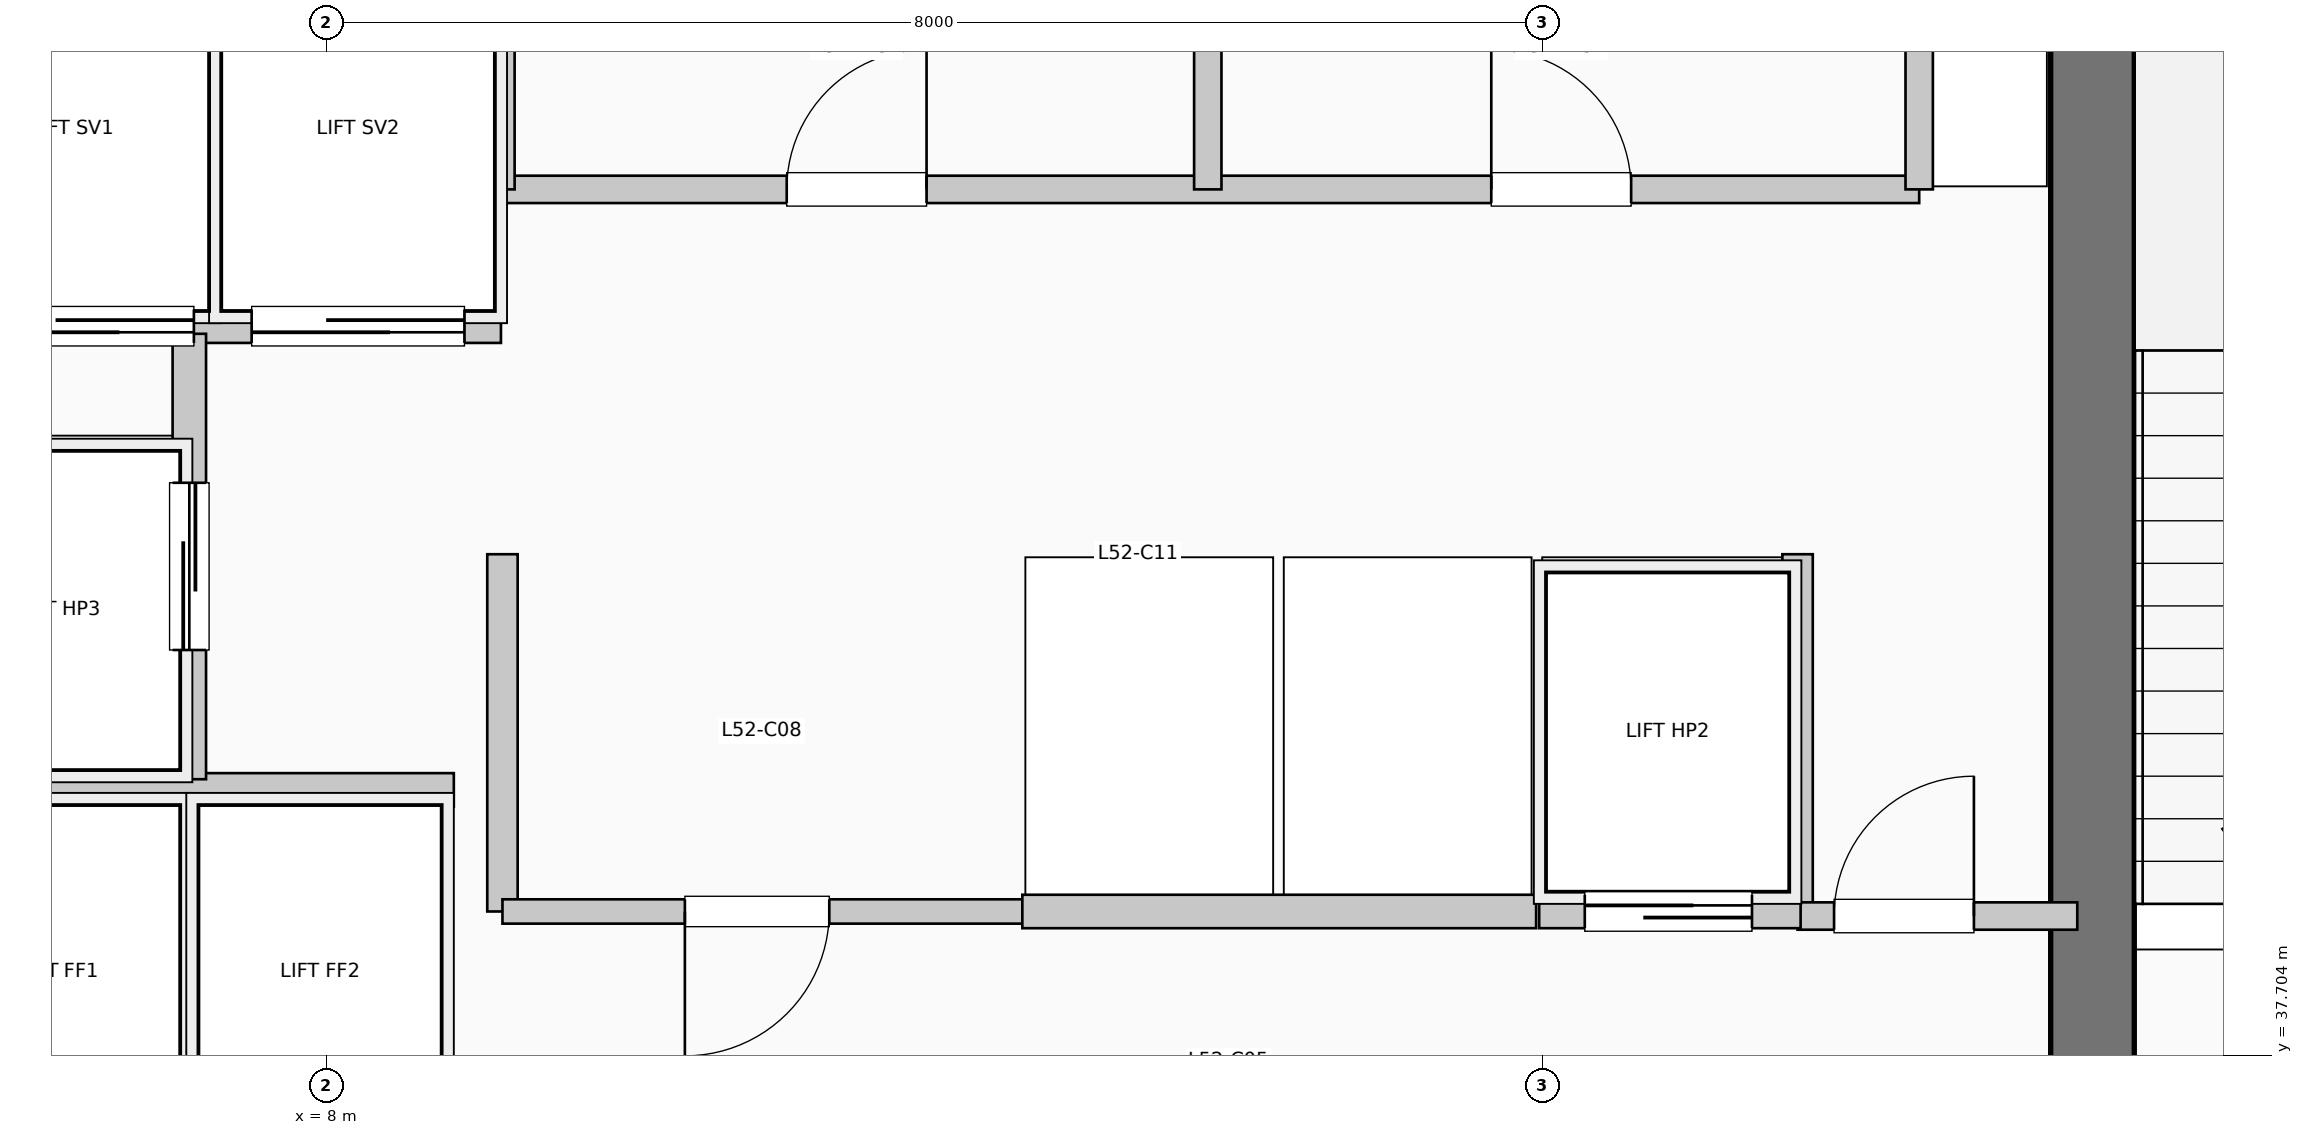
"""IFC4 building model, lengths in metres.
Left out: names, types, materials, properties, quantities, classifications, styles, units other than length and angle.
Written with IfcOpenShell. Run it as: python <this file> out.ifc"""

import sys

from ifc_helpers import new_model, si_unit, direction, frame, frame_2d, origin, place, context, subcontext, project, spatial, rectangle, extrude, element, fill, save


model = new_model("IFC4")
c1 = context("Model", 3, precision=1e-05, world=origin(), true_north=direction((0.0, 1.0)))
c2 = subcontext(c1, "Body", "Model", "MODEL_VIEW")
j1 = project(units=[si_unit("LENGTHUNIT", "METRE"), si_unit("PLANEANGLEUNIT", "RADIAN")], contexts=[c1])
p1 = place(None, origin())
s1 = spatial("IfcSite", under=j1, at=p1, CompositionType="ELEMENT")
p2 = place(p1, origin())
s2 = spatial("IfcBuilding", under=s1, at=p2, CompositionType="ELEMENT")
p3 = place(p2, frame((0.0, 0.0, 215.16)))
s3 = spatial("IfcBuildingStorey", under=s2, at=p3, CompositionType="ELEMENT", Elevation=215.16)
p4 = place(p3, frame((19.62, 37.15, 0.0), z_axis=(0.0, 0.0, 1.0), x_axis=(0.0, 1.0, 0.0)))
e1 = element("IfcWall", 1, at=p4, inside=s3, PredefinedType="SHEAR", context=c2, shape_type="SweptSolid", body=[
    extrude(rectangle(XDim=7.89, YDim=0.55, at=frame_2d((3.945, 0.0))), origin(), (0.0, 0.0, 1.0), 4.62),
])
p5 = place(p3, frame((5.38, 39.45, 0.0), z_axis=(0.0, 0.0, 1.0), x_axis=(1.0, 0.0, 0.0)))
e2 = element("IfcWall", 2, at=p5, inside=s3, PredefinedType="PARTITIONING", context=c2, shape_type="SweptSolid", body=[
    extrude(rectangle(XDim=3.46, YDim=0.22, at=frame_2d((1.73, 0.0))), origin(), (0.0, 0.0, 1.0), 4.37),
])
p6 = place(p3, frame((5.38, 42.5, 0.0), z_axis=(0.0, 0.0, 1.0), x_axis=(1.0, 0.0, 0.0)))
e3 = element("IfcWall", 3, at=p6, inside=s3, PredefinedType="PARTITIONING", context=c2, shape_type="SweptSolid", body=[
    extrude(rectangle(XDim=3.77, YDim=0.22, at=frame_2d((1.885, 0.0))), origin(), (0.0, 0.0, 1.0), 4.37),
])
p7 = place(p6, frame((1.75, 0.0, 0.0), z_axis=(0.0, 0.0, 1.0), x_axis=(-1.0, 0.0, 0.0)))
e4 = element("IfcOpeningElement", 4, at=p7, cuts=e3, PredefinedType="OPENING", context=c2, shape_type="SweptSolid", body=[
    extrude(rectangle(XDim=1.4, YDim=2.2, at=frame_2d((0.7, 1.1))), frame((0.0, 0.12, 0.0), z_axis=(0.0, -1.0, 0.0), x_axis=(1.0, 0.0, 0.0)), (0.0, 0.0, 1.0), 0.24),
])
p8 = place(p6, frame((3.53, 0.0, 0.0), z_axis=(0.0, 0.0, 1.0), x_axis=(-1.0, 0.0, 0.0)))
e5 = element("IfcOpeningElement", 5, at=p8, cuts=e3, PredefinedType="OPENING", context=c2, shape_type="SweptSolid", body=[
    extrude(rectangle(XDim=1.4, YDim=2.2, at=frame_2d((0.7, 1.1))), frame((0.0, 0.12, 0.0), z_axis=(0.0, -1.0, 0.0), x_axis=(1.0, 0.0, 0.0)), (0.0, 0.0, 1.0), 0.24),
])
p9 = place(p3, frame((7.1, 39.52, 0.0), z_axis=(0.0, 0.0, 1.0), x_axis=(0.0, 1.0, 0.0)))
e6 = element("IfcWall", 6, at=p9, inside=s3, PredefinedType="PARTITIONING", context=c2, shape_type="SweptSolid", body=[
    extrude(rectangle(XDim=2.93, YDim=0.22, at=frame_2d((1.465, 0.0))), origin(), (0.0, 0.0, 1.0), 4.37),
])
p10 = place(p9, frame((0.85, 0.0, 0.0)))
e7 = element("IfcOpeningElement", 7, at=p10, cuts=e6, PredefinedType="OPENING", context=c2, shape_type="SweptSolid", body=[
    extrude(rectangle(XDim=1.1, YDim=2.2, at=frame_2d((0.55, 1.1))), frame((0.0, 0.12, 0.0), z_axis=(0.0, -1.0, 0.0), x_axis=(1.0, 0.0, 0.0)), (0.0, 0.0, 1.0), 0.24),
])
for number, where, z_axis, x_axis in (
    (8, (9.16, 38.65, 0.0), (0.0, 0.0, 1.0), (0.0, 1.0, 0.0)),
    (9, (17.68, 38.65, 0.0), (0.0, 0.0, 1.0), (0.0, 1.0, 0.0)),
):
    element("IfcWall", number, at=place(p3, frame(where, z_axis=z_axis, x_axis=x_axis)), inside=s3, PredefinedType="PARTITIONING", context=c2, shape_type="SweptSolid", body=[
        extrude(rectangle(XDim=2.35, YDim=0.2, at=frame_2d((1.175, 0.0))), origin(), (0.0, 0.0, 1.0), 4.37),
    ])
p11 = place(p3, frame((17.68, 38.62, 0.0), z_axis=(0.0, 0.0, 1.0), x_axis=(1.0, 0.0, 0.0)))
e10 = element("IfcWall", 10, at=p11, inside=s3, PredefinedType="PARTITIONING", context=c2, shape_type="SweptSolid", body=[
    extrude(rectangle(XDim=1.84, YDim=0.18, at=frame_2d((0.92, 0.0))), origin(), (0.0, 0.0, 1.0), 4.37),
])
p12 = place(p11, frame((0.24, 0.0, 0.0)))
e11 = element("IfcOpeningElement", 11, at=p12, cuts=e10, PredefinedType="OPENING", context=c2, shape_type="SweptSolid", body=[
    extrude(rectangle(XDim=0.92, YDim=2.1, at=frame_2d((0.46, 1.05))), frame((0.0, 0.1, 0.0), z_axis=(0.0, -1.0, 0.0), x_axis=(1.0, 0.0, 0.0)), (0.0, 0.0, 1.0), 0.2),
])
p13 = place(p3, frame((9.16, 38.65, 0.0), z_axis=(0.0, 0.0, 1.0), x_axis=(1.0, 0.0, 0.0)))
e12 = element("IfcWall", 12, at=p13, inside=s3, PredefinedType="PARTITIONING", context=c2, shape_type="SweptSolid", body=[
    extrude(rectangle(XDim=3.42, YDim=0.16, at=frame_2d((1.71, 0.0))), origin(), (0.0, 0.0, 1.0), 4.37),
])
p14 = place(p13, frame((2.15, 0.0, 0.0), z_axis=(0.0, 0.0, 1.0), x_axis=(-1.0, 0.0, 0.0)))
e13 = element("IfcOpeningElement", 13, at=p14, cuts=e12, PredefinedType="OPENING", context=c2, shape_type="SweptSolid", body=[
    extrude(rectangle(XDim=0.95, YDim=2.15, at=frame_2d((0.475, 1.075))), frame((0.0, 0.09, 0.0), z_axis=(0.0, -1.0, 0.0), x_axis=(1.0, 0.0, 0.0)), (0.0, 0.0, 1.0), 0.18),
])
p15 = place(p3, frame((12.58, 38.65, 0.0), z_axis=(0.0, 0.0, 1.0), x_axis=(1.0, 0.0, 0.0)))
e14 = element("IfcWall", 14, at=p15, inside=s3, PredefinedType="PARTITIONING", context=c2, shape_type="SweptSolid", body=[
    extrude(rectangle(XDim=3.38, YDim=0.22, at=frame_2d((1.69, 0.0))), origin(), (0.0, 0.0, 1.0), 4.37),
])
p16 = place(p3, frame((15.98, 38.65, 0.0), z_axis=(0.0, 0.0, 1.0), x_axis=(1.0, 0.0, 0.0)))
e15 = element("IfcWall", 15, at=p16, inside=s3, PredefinedType="PARTITIONING", context=c2, shape_type="SweptSolid", body=[
    extrude(rectangle(XDim=1.72, YDim=0.22, at=frame_2d((0.86, 0.0))), origin(), (0.0, 0.0, 1.0), 4.37),
])
p17 = place(p16, frame((0.3, 0.0, 0.0)))
e16 = element("IfcOpeningElement", 16, at=p17, cuts=e15, PredefinedType="OPENING", context=c2, shape_type="SweptSolid", body=[
    extrude(rectangle(XDim=1.1, YDim=2.2, at=frame_2d((0.55, 1.1))), frame((0.0, 0.12, 0.0), z_axis=(0.0, -1.0, 0.0), x_axis=(1.0, 0.0, 0.0)), (0.0, 0.0, 1.0), 0.24),
])
p18 = place(p3, frame((9.15, 43.4, 0.0), z_axis=(0.0, 0.0, 1.0), x_axis=(1.0, 0.0, 0.0)))
e17 = element("IfcWall", 17, at=p18, inside=s3, PredefinedType="PLUMBINGWALL", context=c2, shape_type="SweptSolid", body=[
    extrude(rectangle(XDim=9.33, YDim=0.18, at=frame_2d((4.665, 0.0))), origin(), (0.0, 0.0, 1.0), 4.37),
])
p19 = place(p18, frame((1.88, 0.0, 0.0)))
e18 = element("IfcOpeningElement", 18, at=p19, cuts=e17, PredefinedType="OPENING", context=c2, shape_type="SweptSolid", body=[
    extrude(rectangle(XDim=0.92, YDim=2.1, at=frame_2d((0.46, 1.05))), frame((0.0, 0.1, 0.0), z_axis=(0.0, -1.0, 0.0), x_axis=(1.0, 0.0, 0.0)), (0.0, 0.0, 1.0), 0.2),
])
p20 = place(p18, frame((6.515, 0.0, 0.0)))
e19 = element("IfcOpeningElement", 19, at=p20, cuts=e17, PredefinedType="OPENING", context=c2, shape_type="SweptSolid", body=[
    extrude(rectangle(XDim=0.92, YDim=2.1, at=frame_2d((0.46, 1.05))), frame((0.0, 0.1, 0.0), z_axis=(0.0, -1.0, 0.0), x_axis=(1.0, 0.0, 0.0)), (0.0, 0.0, 1.0), 0.2),
])
for number, where, z_axis, x_axis in (
    (20, (9.15, 43.4, 0.0), (0.0, 0.0, 1.0), (0.0, 1.0, 0.0)),
    (21, (18.48, 43.4, 0.0), (0.0, 0.0, 1.0), (0.0, 1.0, 0.0)),
    (22, (13.8, 43.4, 0.0), (0.0, 0.0, 1.0), (0.0, 1.0, 0.0)),
):
    element("IfcWall", number, at=place(p3, frame(where, z_axis=z_axis, x_axis=x_axis)), inside=s3, PredefinedType="PLUMBINGWALL", context=c2, shape_type="SweptSolid", body=[
        extrude(rectangle(XDim=1.88, YDim=0.18, at=frame_2d((0.94, 0.0))), origin(), (0.0, 0.0, 1.0), 4.37),
    ])
p21 = place(p7, origin())
e23 = element("IfcDoor", 23, at=p21, inside=s3, OperationType="SLIDING_TO_LEFT", PredefinedType="DOOR", context=c2, shape_type="SweptSolid", body=[
    extrude(rectangle(XDim=1.4, YDim=2.2, at=frame_2d((0.7, 1.1))), frame((0.0, 0.025, 0.0), z_axis=(0.0, -1.0, 0.0), x_axis=(1.0, 0.0, 0.0)), (0.0, 0.0, 1.0), 0.05),
])
fill(e4, e23)
p22 = place(p8, origin())
e24 = element("IfcDoor", 24, at=p22, inside=s3, OperationType="SLIDING_TO_LEFT", PredefinedType="DOOR", context=c2, shape_type="SweptSolid", body=[
    extrude(rectangle(XDim=1.4, YDim=2.2, at=frame_2d((0.7, 1.1))), frame((0.0, 0.025, 0.0), z_axis=(0.0, -1.0, 0.0), x_axis=(1.0, 0.0, 0.0)), (0.0, 0.0, 1.0), 0.05),
])
fill(e5, e24)
p23 = place(p10, origin())
e25 = element("IfcDoor", 25, at=p23, inside=s3, OperationType="SLIDING_TO_LEFT", PredefinedType="DOOR", context=c2, shape_type="SweptSolid", body=[
    extrude(rectangle(XDim=1.1, YDim=2.2, at=frame_2d((0.55, 1.1))), frame((0.0, 0.025, 0.0), z_axis=(0.0, -1.0, 0.0), x_axis=(1.0, 0.0, 0.0)), (0.0, 0.0, 1.0), 0.05),
])
fill(e7, e25)
p24 = place(p12, origin())
e26 = element("IfcDoor", 26, at=p24, inside=s3, OperationType="SINGLE_SWING_RIGHT", PredefinedType="DOOR", context=c2, shape_type="SweptSolid", body=[
    extrude(rectangle(XDim=0.92, YDim=2.1, at=frame_2d((0.46, 1.05))), frame((0.0, 0.025, 0.0), z_axis=(0.0, -1.0, 0.0), x_axis=(1.0, 0.0, 0.0)), (0.0, 0.0, 1.0), 0.05),
])
fill(e11, e26)
p25 = place(p14, origin())
e27 = element("IfcDoor", 27, at=p25, inside=s3, OperationType="SINGLE_SWING_LEFT", PredefinedType="DOOR", context=c2, shape_type="SweptSolid", body=[
    extrude(rectangle(XDim=0.95, YDim=2.15, at=frame_2d((0.475, 1.075))), frame((0.0, 0.025, 0.0), z_axis=(0.0, -1.0, 0.0), x_axis=(1.0, 0.0, 0.0)), (0.0, 0.0, 1.0), 0.05),
])
fill(e13, e27)
p26 = place(p17, origin())
e28 = element("IfcDoor", 28, at=p26, inside=s3, OperationType="SLIDING_TO_LEFT", PredefinedType="DOOR", context=c2, shape_type="SweptSolid", body=[
    extrude(rectangle(XDim=1.1, YDim=2.2, at=frame_2d((0.55, 1.1))), frame((0.0, 0.025, 0.0), z_axis=(0.0, -1.0, 0.0), x_axis=(1.0, 0.0, 0.0)), (0.0, 0.0, 1.0), 0.05),
])
fill(e16, e28)
p27 = place(p19, origin())
e29 = element("IfcDoor", 29, at=p27, inside=s3, OperationType="SINGLE_SWING_RIGHT", PredefinedType="DOOR", context=c2, shape_type="SweptSolid", body=[
    extrude(rectangle(XDim=0.92, YDim=2.1, at=frame_2d((0.46, 1.05))), frame((0.0, 0.025, 0.0), z_axis=(0.0, -1.0, 0.0), x_axis=(1.0, 0.0, 0.0)), (0.0, 0.0, 1.0), 0.05),
])
fill(e18, e29)
p28 = place(p20, origin())
e30 = element("IfcDoor", 30, at=p28, inside=s3, OperationType="SINGLE_SWING_LEFT", PredefinedType="DOOR", context=c2, shape_type="SweptSolid", body=[
    extrude(rectangle(XDim=0.92, YDim=2.1, at=frame_2d((0.46, 1.05))), frame((0.0, 0.025, 0.0), z_axis=(0.0, -1.0, 0.0), x_axis=(1.0, 0.0, 0.0)), (0.0, 0.0, 1.0), 0.05),
])
fill(e19, e30)
save(model, sys.argv[1])
